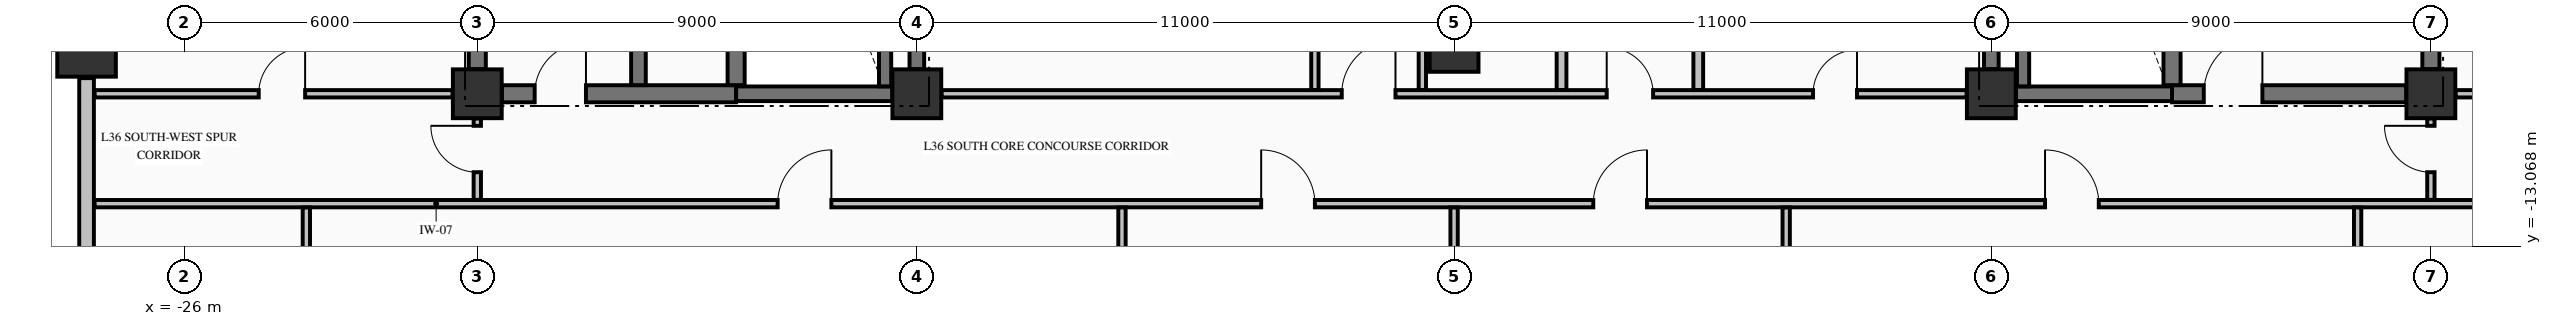
"""IFC4 building model, lengths in metres.
Left out: names, types, materials, properties, quantities, classifications, styles, units other than length and angle.
Written with IfcOpenShell. Run it as: python <this file> out.ifc"""

import sys

from ifc_helpers import new_model, si_unit, direction, frame, frame_2d, origin, origin_2d, place, context, subcontext, project, spatial, rectangle, extrude, element, fill, save


model = new_model("IFC4")
c1 = context("Model", 3, precision=1e-05, world=origin(), true_north=direction((0.0, 1.0)))
c2 = subcontext(c1, "Body", "Model", "MODEL_VIEW")
j1 = project(units=[si_unit("LENGTHUNIT", "METRE"), si_unit("PLANEANGLEUNIT", "RADIAN")], contexts=[c1])
p1 = place(None, origin())
s1 = spatial("IfcSite", under=j1, at=p1, CompositionType="ELEMENT")
p2 = place(p1, origin())
s2 = spatial("IfcBuilding", under=s1, at=p2, CompositionType="ELEMENT")
p3 = place(p2, frame((0.0, 0.0, 142.77)))
s3 = spatial("IfcBuildingStorey", under=s2, at=p3, CompositionType="ELEMENT", Elevation=142.77)
p4 = place(p3, frame((-28.0, -9.0, -0.325), z_axis=(0.0, 0.0, 1.0), x_axis=(1.0, 0.0, 0.0)))
e1 = element("IfcColumn", 1, at=p4, inside=s3, PredefinedType="COLUMN", context=c2, shape_type="SweptSolid", body=[
    extrude(rectangle(XDim=1.2, YDim=1.2, at=origin_2d()), origin(), (0.0, 0.0, 1.0), 3.645),
])
for number, where, z_axis, x_axis in (
    (2, (-20.0, -9.95, -0.325), (0.0, 0.0, 1.0), (1.0, 0.0, 0.0)),
    (3, (-11.0, -9.95, -0.325), (0.0, 0.0, 1.0), (1.0, 0.0, 0.0)),
    (4, (11.0, -9.95, -0.325), (0.0, 0.0, 1.0), (1.0, 0.0, 0.0)),
    (5, (20.0, -9.95, -0.325), (0.0, 0.0, 1.0), (1.0, 0.0, 0.0)),
    (6, (0.0, -9.0, -0.325), (0.0, 0.0, 1.0), (1.0, 0.0, 0.0)),
):
    element("IfcColumn", number, at=place(p3, frame(where, z_axis=z_axis, x_axis=x_axis)), inside=s3, PredefinedType="COLUMN", context=c2, shape_type="SweptSolid", body=[
        extrude(rectangle(XDim=1.0, YDim=1.0, at=origin_2d()), origin(), (0.0, 0.0, 1.0), 3.645),
    ])
p5 = place(p3, frame((-28.0, -9.63, 0.0), z_axis=(0.0, 0.0, 1.0), x_axis=(0.0, -1.0, 0.0)))
e7 = element("IfcWall", 7, at=p5, inside=s3, PredefinedType="STANDARD", context=c2, shape_type="SweptSolid", body=[
    extrude(rectangle(XDim=10.74, YDim=0.3, at=frame_2d((5.37, 0.0))), origin(), (0.0, 0.0, 1.0), 2.712),
])
p6 = place(p3, frame((-19.496, -9.95, 0.0), z_axis=(0.0, 0.0, 1.0), x_axis=(1.0, 0.0, 0.0)))
e8 = element("IfcWall", 8, at=p6, inside=s3, PredefinedType="SHEAR", context=c2, shape_type="SweptSolid", body=[
    extrude(rectangle(XDim=4.796, YDim=0.35, at=frame_2d((2.398, 0.0))), origin(), (0.0, 0.0, 1.0), 3.32),
])
p7 = place(p6, frame((0.671, 0.0, 0.0)))
e9 = element("IfcOpeningElement", 9, at=p7, cuts=e8, PredefinedType="OPENING", context=c2, shape_type="SweptSolid", body=[
    extrude(rectangle(XDim=1.05, YDim=2.15, at=frame_2d((0.525, 1.075))), frame((0.0, 0.185, 0.0), z_axis=(0.0, -1.0, 0.0), x_axis=(1.0, 0.0, 0.0)), (0.0, 0.0, 1.0), 0.37),
])
for number, where, z_axis, x_axis in (
    (10, (-14.7, -9.95, 0.0), (0.0, 0.0, 1.0), (1.0, 0.0, 0.0)),
    (11, (11.504, -9.95, 0.0), (0.0, 0.0, 1.0), (1.0, 0.0, 0.0)),
):
    element("IfcWall", number, at=place(p3, frame(where, z_axis=z_axis, x_axis=x_axis)), inside=s3, PredefinedType="SHEAR", context=c2, shape_type="SweptSolid", body=[
        extrude(rectangle(XDim=3.196, YDim=0.3, at=frame_2d((1.598, 0.0))), origin(), (0.0, 0.0, 1.0), 3.32),
    ])
p8 = place(p3, frame((14.7, -9.95, 0.0), z_axis=(0.0, 0.0, 1.0), x_axis=(1.0, 0.0, 0.0)))
e12 = element("IfcWall", 12, at=p8, inside=s3, PredefinedType="SHEAR", context=c2, shape_type="SweptSolid", body=[
    extrude(rectangle(XDim=4.796, YDim=0.35, at=frame_2d((2.398, 0.0))), origin(), (0.0, 0.0, 1.0), 3.32),
])
p9 = place(p8, frame((0.65, 0.0, 0.0)))
e13 = element("IfcOpeningElement", 13, at=p9, cuts=e12, PredefinedType="OPENING", context=c2, shape_type="SweptSolid", body=[
    extrude(rectangle(XDim=1.2, YDim=2.15, at=frame_2d((0.6, 1.075))), frame((0.0, 0.185, 0.0), z_axis=(0.0, -1.0, 0.0), x_axis=(1.0, 0.0, 0.0)), (0.0, 0.0, 1.0), 0.37),
])
p10 = place(p3, frame((-27.835, -12.2, 0.0), z_axis=(0.0, 0.0, 1.0), x_axis=(1.0, 0.0, 0.0)))
e14 = element("IfcWall", 14, at=p10, inside=s3, PredefinedType="PARTITIONING", context=c2, shape_type="SweptSolid", body=[
    extrude(rectangle(XDim=50.67, YDim=0.15, at=frame_2d((25.335, 0.0))), origin(), (0.0, 0.0, 1.0), 3.32),
])
p11 = place(p10, frame((13.985, 0.0, 0.0)))
e15 = element("IfcOpeningElement", 15, at=p11, cuts=e14, PredefinedType="OPENING", context=c2, shape_type="SweptSolid", body=[
    extrude(rectangle(XDim=1.1, YDim=2.15, at=frame_2d((0.55, 1.075))), frame((0.0, 0.085, 0.0), z_axis=(0.0, -1.0, 0.0), x_axis=(1.0, 0.0, 0.0)), (0.0, 0.0, 1.0), 0.17),
])
p12 = place(p10, frame((23.885, 0.0, 0.0)))
e16 = element("IfcOpeningElement", 16, at=p12, cuts=e14, PredefinedType="OPENING", context=c2, shape_type="SweptSolid", body=[
    extrude(rectangle(XDim=1.1, YDim=2.15, at=frame_2d((0.55, 1.075))), frame((0.0, 0.085, 0.0), z_axis=(0.0, -1.0, 0.0), x_axis=(1.0, 0.0, 0.0)), (0.0, 0.0, 1.0), 0.17),
])
p13 = place(p10, frame((30.685, 0.0, 0.0)))
e17 = element("IfcOpeningElement", 17, at=p13, cuts=e14, PredefinedType="OPENING", context=c2, shape_type="SweptSolid", body=[
    extrude(rectangle(XDim=1.1, YDim=2.15, at=frame_2d((0.55, 1.075))), frame((0.0, 0.085, 0.0), z_axis=(0.0, -1.0, 0.0), x_axis=(1.0, 0.0, 0.0)), (0.0, 0.0, 1.0), 0.17),
])
p14 = place(p10, frame((39.935, 0.0, 0.0)))
e18 = element("IfcOpeningElement", 18, at=p14, cuts=e14, PredefinedType="OPENING", context=c2, shape_type="SweptSolid", body=[
    extrude(rectangle(XDim=1.1, YDim=2.15, at=frame_2d((0.55, 1.075))), frame((0.0, 0.085, 0.0), z_axis=(0.0, -1.0, 0.0), x_axis=(1.0, 0.0, 0.0)), (0.0, 0.0, 1.0), 0.17),
])
p15 = place(p3, frame((-27.835, -9.95, 0.0), z_axis=(0.0, 0.0, 1.0), x_axis=(1.0, 0.0, 0.0)))
e19 = element("IfcWall", 19, at=p15, inside=s3, PredefinedType="PARTITIONING", context=c2, shape_type="SweptSolid", body=[
    extrude(rectangle(XDim=7.329, YDim=0.15, at=frame_2d((3.665, 0.0))), origin(), (0.0, 0.0, 1.0), 3.32),
])
p16 = place(p15, frame((3.36, 0.0, 0.0)))
e20 = element("IfcOpeningElement", 20, at=p16, cuts=e19, PredefinedType="OPENING", context=c2, shape_type="SweptSolid", body=[
    extrude(rectangle(XDim=0.95, YDim=2.15, at=frame_2d((0.475, 1.075))), frame((0.0, 0.085, 0.0), z_axis=(0.0, -1.0, 0.0), x_axis=(1.0, 0.0, 0.0)), (0.0, 0.0, 1.0), 0.17),
])
p17 = place(p3, frame((-10.494, -9.95, 0.0), z_axis=(0.0, 0.0, 1.0), x_axis=(1.0, 0.0, 0.0)))
e21 = element("IfcWall", 21, at=p17, inside=s3, PredefinedType="PARTITIONING", context=c2, shape_type="SweptSolid", body=[
    extrude(rectangle(XDim=20.988, YDim=0.15, at=frame_2d((10.494, 0.0))), origin(), (0.0, 0.0, 1.0), 3.32),
])
p18 = place(p17, frame((8.194, 0.0, 0.0)))
e22 = element("IfcOpeningElement", 22, at=p18, cuts=e21, PredefinedType="OPENING", context=c2, shape_type="SweptSolid", body=[
    extrude(rectangle(XDim=1.1, YDim=2.15, at=frame_2d((0.55, 1.075))), frame((0.0, 0.085, 0.0), z_axis=(0.0, -1.0, 0.0), x_axis=(1.0, 0.0, 0.0)), (0.0, 0.0, 1.0), 0.17),
])
p19 = place(p17, frame((13.619, 0.0, 0.0)))
e23 = element("IfcOpeningElement", 23, at=p19, cuts=e21, PredefinedType="OPENING", context=c2, shape_type="SweptSolid", body=[
    extrude(rectangle(XDim=0.95, YDim=2.15, at=frame_2d((0.475, 1.075))), frame((0.0, 0.085, 0.0), z_axis=(0.0, -1.0, 0.0), x_axis=(1.0, 0.0, 0.0)), (0.0, 0.0, 1.0), 0.17),
])
p20 = place(p17, frame((17.844, 0.0, 0.0)))
e24 = element("IfcOpeningElement", 24, at=p20, cuts=e21, PredefinedType="OPENING", context=c2, shape_type="SweptSolid", body=[
    extrude(rectangle(XDim=0.9, YDim=2.15, at=frame_2d((0.45, 1.075))), frame((0.0, 0.085, 0.0), z_axis=(0.0, -1.0, 0.0), x_axis=(1.0, 0.0, 0.0)), (0.0, 0.0, 1.0), 0.17),
])
p21 = place(p3, frame((20.506, -9.95, 0.0), z_axis=(0.0, 0.0, 1.0), x_axis=(1.0, 0.0, 0.0)))
e25 = element("IfcWall", 25, at=p21, inside=s3, PredefinedType="PARTITIONING", context=c2, shape_type="SweptSolid", body=[
    extrude(rectangle(XDim=2.329, YDim=0.15, at=frame_2d((1.165, 0.0))), origin(), (0.0, 0.0, 1.0), 3.32),
])
p22 = place(p21, frame((0.494, 0.0, 0.0)))
e26 = element("IfcOpeningElement", 26, at=p22, cuts=e25, PredefinedType="OPENING", context=c2, shape_type="SweptSolid", body=[
    extrude(rectangle(XDim=1.0, YDim=2.15, at=frame_2d((0.5, 1.075))), frame((0.0, 0.085, 0.0), z_axis=(0.0, -1.0, 0.0), x_axis=(1.0, 0.0, 0.0)), (0.0, 0.0, 1.0), 0.17),
])
p23 = place(p3, frame((-20.0, -9.446, 0.0), z_axis=(0.0, 0.0, 1.0), x_axis=(0.0, 1.0, 0.0)))
e27 = element("IfcWall", 27, at=p23, inside=s3, PredefinedType="SHEAR", context=c2, shape_type="SweptSolid", body=[
    extrude(rectangle(XDim=8.942, YDim=0.35, at=frame_2d((4.471, 0.0))), origin(), (0.0, 0.0, 1.0), 3.32),
])
p24 = place(p3, frame((-16.7, -9.773, 0.0), z_axis=(0.0, 0.0, 1.0), x_axis=(0.0, 1.0, 0.0)))
e28 = element("IfcWall", 28, at=p24, inside=s3, PredefinedType="SHEAR", context=c2, shape_type="SweptSolid", body=[
    extrude(rectangle(XDim=9.371, YDim=0.3, at=frame_2d((4.686, 0.0))), origin(), (0.0, 0.0, 1.0), 3.32),
])
p25 = place(p3, frame((-14.7, -9.773, 0.0), z_axis=(0.0, 0.0, 1.0), x_axis=(0.0, 1.0, 0.0)))
e29 = element("IfcWall", 29, at=p25, inside=s3, PredefinedType="SHEAR", context=c2, shape_type="SweptSolid", body=[
    extrude(rectangle(XDim=9.371, YDim=0.35, at=frame_2d((4.686, 0.0))), origin(), (0.0, 0.0, 1.0), 3.32),
])
p26 = place(p3, frame((-11.65, -9.798, 0.0), z_axis=(0.0, 0.0, 1.0), x_axis=(0.0, 1.0, 0.0)))
e30 = element("IfcWall", 30, at=p26, inside=s3, PredefinedType="SOLIDWALL", context=c2, shape_type="SweptSolid", body=[
    extrude(rectangle(XDim=9.396, YDim=0.25, at=frame_2d((4.698, 0.0))), origin(), (0.0, 0.0, 1.0), 3.32),
])
for number, where, z_axis, x_axis in (
    (31, (-11.0, -9.446, 0.0), (0.0, 0.0, 1.0), (0.0, 1.0, 0.0)),
    (32, (11.0, -9.446, 0.0), (0.0, 0.0, 1.0), (0.0, 1.0, 0.0)),
):
    element("IfcWall", number, at=place(p3, frame(where, z_axis=z_axis, x_axis=x_axis)), inside=s3, PredefinedType="SHEAR", context=c2, shape_type="SweptSolid", body=[
        extrude(rectangle(XDim=8.942, YDim=0.3, at=frame_2d((4.471, 0.0))), origin(), (0.0, 0.0, 1.0), 3.32),
    ])
p27 = place(p3, frame((11.65, -9.798, 0.0), z_axis=(0.0, 0.0, 1.0), x_axis=(0.0, 1.0, 0.0)))
e33 = element("IfcWall", 33, at=p27, inside=s3, PredefinedType="SOLIDWALL", context=c2, shape_type="SweptSolid", body=[
    extrude(rectangle(XDim=9.396, YDim=0.25, at=frame_2d((4.698, 0.0))), origin(), (0.0, 0.0, 1.0), 3.32),
])
p28 = place(p3, frame((14.7, -9.773, 0.0), z_axis=(0.0, 0.0, 1.0), x_axis=(0.0, 1.0, 0.0)))
e34 = element("IfcWall", 34, at=p28, inside=s3, PredefinedType="SHEAR", context=c2, shape_type="SweptSolid", body=[
    extrude(rectangle(XDim=9.371, YDim=0.35, at=frame_2d((4.686, 0.0))), origin(), (0.0, 0.0, 1.0), 3.32),
])
p29 = place(p3, frame((20.0, -9.446, 0.0), z_axis=(0.0, 0.0, 1.0), x_axis=(0.0, 1.0, 0.0)))
e35 = element("IfcWall", 35, at=p29, inside=s3, PredefinedType="SHEAR", context=c2, shape_type="SweptSolid", body=[
    extrude(rectangle(XDim=2.269, YDim=0.35, at=frame_2d((1.135, 0.0))), origin(), (0.0, 0.0, 1.0), 3.32),
])
p30 = place(p3, frame((-23.5, -20.394, 0.0), z_axis=(0.0, 0.0, 1.0), x_axis=(0.0, 1.0, 0.0)))
e36 = element("IfcWall", 36, at=p30, inside=s3, PredefinedType="PARTITIONING", context=c2, shape_type="SweptSolid", body=[
    extrude(rectangle(XDim=8.116, YDim=0.15, at=frame_2d((4.058, 0.0))), origin(), (0.0, 0.0, 1.0), 3.32),
])
p31 = place(p3, frame((-20.0, -12.122, 0.0), z_axis=(0.0, 0.0, 1.0), x_axis=(0.0, 1.0, 0.0)))
e37 = element("IfcWall", 37, at=p31, inside=s3, PredefinedType="PARTITIONING", context=c2, shape_type="SweptSolid", body=[
    extrude(rectangle(XDim=1.666, YDim=0.15, at=frame_2d((0.833, 0.0))), origin(), (0.0, 0.0, 1.0), 2.81),
])
p32 = place(p31, frame((0.566, 0.0, 0.0)))
e38 = element("IfcOpeningElement", 38, at=p32, cuts=e37, PredefinedType="OPENING", context=c2, shape_type="SweptSolid", body=[
    extrude(rectangle(XDim=0.95, YDim=2.15, at=frame_2d((0.475, 1.075))), frame((0.0, 0.085, 0.0), z_axis=(0.0, -1.0, 0.0), x_axis=(1.0, 0.0, 0.0)), (0.0, 0.0, 1.0), 0.17),
])
p33 = place(p3, frame((-6.8, -25.335, 0.0), z_axis=(0.0, 0.0, 1.0), x_axis=(0.0, 1.0, 0.0)))
e39 = element("IfcWall", 39, at=p33, inside=s3, PredefinedType="PARTITIONING", context=c2, shape_type="SweptSolid", body=[
    extrude(rectangle(XDim=13.057, YDim=0.15, at=frame_2d((6.528, 0.0))), origin(), (0.0, 0.0, 1.0), 3.32),
])
p34 = place(p3, frame((-2.85, -9.872, 0.0), z_axis=(0.0, 0.0, 1.0), x_axis=(0.0, 1.0, 0.0)))
e40 = element("IfcWall", 40, at=p34, inside=s3, PredefinedType="PARTITIONING", context=c2, shape_type="SweptSolid", body=[
    extrude(rectangle(XDim=9.544, YDim=0.15, at=frame_2d((4.772, 0.0))), origin(), (0.0, 0.0, 1.0), 3.32),
])
p35 = place(p3, frame((-0.65, -9.872, 0.0), z_axis=(0.0, 0.0, 1.0), x_axis=(0.0, 1.0, 0.0)))
e41 = element("IfcWall", 41, at=p35, inside=s3, PredefinedType="PARTITIONING", context=c2, shape_type="SweptSolid", body=[
    extrude(rectangle(XDim=4.419, YDim=0.15, at=frame_2d((2.209, 0.0))), origin(), (0.0, 0.0, 1.0), 3.32),
])
p36 = place(p35, frame((2.597, 0.0, 0.0)))
e42 = element("IfcOpeningElement", 42, at=p36, cuts=e41, PredefinedType="OPENING", context=c2, shape_type="SweptSolid", body=[
    extrude(rectangle(XDim=0.95, YDim=2.15, at=frame_2d((0.475, 1.075))), frame((0.0, 0.085, 0.0), z_axis=(0.0, -1.0, 0.0), x_axis=(1.0, 0.0, 0.0)), (0.0, 0.0, 1.0), 0.17),
])
p37 = place(p3, frame((0.0, -24.894, 0.0), z_axis=(0.0, 0.0, 1.0), x_axis=(0.0, 1.0, 0.0)))
e43 = element("IfcWall", 43, at=p37, inside=s3, PredefinedType="PARTITIONING", context=c2, shape_type="SweptSolid", body=[
    extrude(rectangle(XDim=12.616, YDim=0.15, at=frame_2d((6.308, 0.0))), origin(), (0.0, 0.0, 1.0), 3.32),
])
for number, where, z_axis, x_axis in (
    (44, (2.2, -9.872, 0.0), (0.0, 0.0, 1.0), (0.0, 1.0, 0.0)),
    (45, (5.0, -9.872, 0.0), (0.0, 0.0, 1.0), (0.0, 1.0, 0.0)),
):
    element("IfcWall", number, at=place(p3, frame(where, z_axis=z_axis, x_axis=x_axis)), inside=s3, PredefinedType="PARTITIONING", context=c2, shape_type="SweptSolid", body=[
        extrude(rectangle(XDim=4.419, YDim=0.2, at=frame_2d((2.209, 0.0))), origin(), (0.0, 0.0, 1.0), 3.32),
    ])
p38 = place(p3, frame((6.8, -25.44, 0.0), z_axis=(0.0, 0.0, 1.0), x_axis=(0.0, 1.0, 0.0)))
e46 = element("IfcWall", 46, at=p38, inside=s3, PredefinedType="PARTITIONING", context=c2, shape_type="SweptSolid", body=[
    extrude(rectangle(XDim=13.162, YDim=0.15, at=frame_2d((6.581, 0.0))), origin(), (0.0, 0.0, 1.0), 3.32),
])
p39 = place(p3, frame((18.5, -20.394, 0.0), z_axis=(0.0, 0.0, 1.0), x_axis=(0.0, 1.0, 0.0)))
e47 = element("IfcWall", 47, at=p39, inside=s3, PredefinedType="PARTITIONING", context=c2, shape_type="SweptSolid", body=[
    extrude(rectangle(XDim=8.116, YDim=0.15, at=frame_2d((4.058, 0.0))), origin(), (0.0, 0.0, 1.0), 3.32),
])
p40 = place(p3, frame((20.0, -12.122, 0.0), z_axis=(0.0, 0.0, 1.0), x_axis=(0.0, 1.0, 0.0)))
e48 = element("IfcWall", 48, at=p40, inside=s3, PredefinedType="PARTITIONING", context=c2, shape_type="SweptSolid", body=[
    extrude(rectangle(XDim=1.666, YDim=0.15, at=frame_2d((0.833, 0.0))), origin(), (0.0, 0.0, 1.0), 2.81),
])
p41 = place(p40, frame((0.566, 0.0, 0.0)))
e49 = element("IfcOpeningElement", 49, at=p41, cuts=e48, PredefinedType="OPENING", context=c2, shape_type="SweptSolid", body=[
    extrude(rectangle(XDim=0.95, YDim=2.15, at=frame_2d((0.475, 1.075))), frame((0.0, 0.085, 0.0), z_axis=(0.0, -1.0, 0.0), x_axis=(1.0, 0.0, 0.0)), (0.0, 0.0, 1.0), 0.17),
])
p42 = place(p7, origin())
e50 = element("IfcDoor", 50, at=p42, inside=s3, OperationType="SINGLE_SWING_RIGHT", PredefinedType="DOOR", context=c2, shape_type="SweptSolid", body=[
    extrude(rectangle(XDim=1.05, YDim=2.15, at=frame_2d((0.525, 1.075))), frame((0.0, 0.025, 0.0), z_axis=(0.0, -1.0, 0.0), x_axis=(1.0, 0.0, 0.0)), (0.0, 0.0, 1.0), 0.05),
])
fill(e9, e50)
p43 = place(p9, origin())
e51 = element("IfcDoor", 51, at=p43, inside=s3, OperationType="SINGLE_SWING_RIGHT", PredefinedType="DOOR", context=c2, shape_type="SweptSolid", body=[
    extrude(rectangle(XDim=1.2, YDim=2.15, at=frame_2d((0.6, 1.075))), frame((0.0, 0.025, 0.0), z_axis=(0.0, -1.0, 0.0), x_axis=(1.0, 0.0, 0.0)), (0.0, 0.0, 1.0), 0.05),
])
fill(e13, e51)
p44 = place(p18, origin())
e52 = element("IfcDoor", 52, at=p44, inside=s3, OperationType="SINGLE_SWING_RIGHT", PredefinedType="DOOR", context=c2, shape_type="SweptSolid", body=[
    extrude(rectangle(XDim=1.1, YDim=2.15, at=frame_2d((0.55, 1.075))), frame((0.0, 0.025, 0.0), z_axis=(0.0, -1.0, 0.0), x_axis=(1.0, 0.0, 0.0)), (0.0, 0.0, 1.0), 0.05),
])
fill(e22, e52)
p45 = place(p11, origin())
e53 = element("IfcDoor", 53, at=p45, inside=s3, OperationType="SINGLE_SWING_RIGHT", PredefinedType="DOOR", context=c2, shape_type="SweptSolid", body=[
    extrude(rectangle(XDim=1.1, YDim=2.15, at=frame_2d((0.55, 1.075))), frame((0.0, 0.025, 0.0), z_axis=(0.0, -1.0, 0.0), x_axis=(1.0, 0.0, 0.0)), (0.0, 0.0, 1.0), 0.05),
])
fill(e15, e53)
p46 = place(p12, origin())
e54 = element("IfcDoor", 54, at=p46, inside=s3, OperationType="SINGLE_SWING_LEFT", PredefinedType="DOOR", context=c2, shape_type="SweptSolid", body=[
    extrude(rectangle(XDim=1.1, YDim=2.15, at=frame_2d((0.55, 1.075))), frame((0.0, 0.025, 0.0), z_axis=(0.0, -1.0, 0.0), x_axis=(1.0, 0.0, 0.0)), (0.0, 0.0, 1.0), 0.05),
])
fill(e16, e54)
p47 = place(p13, origin())
e55 = element("IfcDoor", 55, at=p47, inside=s3, OperationType="SINGLE_SWING_RIGHT", PredefinedType="DOOR", context=c2, shape_type="SweptSolid", body=[
    extrude(rectangle(XDim=1.1, YDim=2.15, at=frame_2d((0.55, 1.075))), frame((0.0, 0.025, 0.0), z_axis=(0.0, -1.0, 0.0), x_axis=(1.0, 0.0, 0.0)), (0.0, 0.0, 1.0), 0.05),
])
fill(e17, e55)
p48 = place(p14, origin())
e56 = element("IfcDoor", 56, at=p48, inside=s3, OperationType="SINGLE_SWING_LEFT", PredefinedType="DOOR", context=c2, shape_type="SweptSolid", body=[
    extrude(rectangle(XDim=1.1, YDim=2.15, at=frame_2d((0.55, 1.075))), frame((0.0, 0.025, 0.0), z_axis=(0.0, -1.0, 0.0), x_axis=(1.0, 0.0, 0.0)), (0.0, 0.0, 1.0), 0.05),
])
fill(e18, e56)
p49 = place(p19, origin())
e57 = element("IfcDoor", 57, at=p49, inside=s3, OperationType="SINGLE_SWING_LEFT", PredefinedType="DOOR", context=c2, shape_type="SweptSolid", body=[
    extrude(rectangle(XDim=0.95, YDim=2.15, at=frame_2d((0.475, 1.075))), frame((0.0, 0.025, 0.0), z_axis=(0.0, -1.0, 0.0), x_axis=(1.0, 0.0, 0.0)), (0.0, 0.0, 1.0), 0.05),
])
fill(e23, e57)
p50 = place(p20, origin())
e58 = element("IfcDoor", 58, at=p50, inside=s3, OperationType="SINGLE_SWING_RIGHT", PredefinedType="DOOR", context=c2, shape_type="SweptSolid", body=[
    extrude(rectangle(XDim=0.9, YDim=2.15, at=frame_2d((0.45, 1.075))), frame((0.0, 0.025, 0.0), z_axis=(0.0, -1.0, 0.0), x_axis=(1.0, 0.0, 0.0)), (0.0, 0.0, 1.0), 0.05),
])
fill(e24, e58)
p51 = place(p32, origin())
e59 = element("IfcDoor", 59, at=p51, inside=s3, OperationType="SINGLE_SWING_RIGHT", PredefinedType="DOOR", context=c2, shape_type="SweptSolid", body=[
    extrude(rectangle(XDim=0.95, YDim=2.15, at=frame_2d((0.475, 1.075))), frame((0.0, 0.025, 0.0), z_axis=(0.0, -1.0, 0.0), x_axis=(1.0, 0.0, 0.0)), (0.0, 0.0, 1.0), 0.05),
])
fill(e38, e59)
p52 = place(p16, origin())
e60 = element("IfcDoor", 60, at=p52, inside=s3, OperationType="SINGLE_SWING_RIGHT", PredefinedType="DOOR", context=c2, shape_type="SweptSolid", body=[
    extrude(rectangle(XDim=0.95, YDim=2.15, at=frame_2d((0.475, 1.075))), frame((0.0, 0.025, 0.0), z_axis=(0.0, -1.0, 0.0), x_axis=(1.0, 0.0, 0.0)), (0.0, 0.0, 1.0), 0.05),
])
fill(e20, e60)
p53 = place(p41, origin())
e61 = element("IfcDoor", 61, at=p53, inside=s3, OperationType="SINGLE_SWING_RIGHT", PredefinedType="DOOR", context=c2, shape_type="SweptSolid", body=[
    extrude(rectangle(XDim=0.95, YDim=2.15, at=frame_2d((0.475, 1.075))), frame((0.0, 0.025, 0.0), z_axis=(0.0, -1.0, 0.0), x_axis=(1.0, 0.0, 0.0)), (0.0, 0.0, 1.0), 0.05),
])
fill(e49, e61)
save(model, sys.argv[1])
